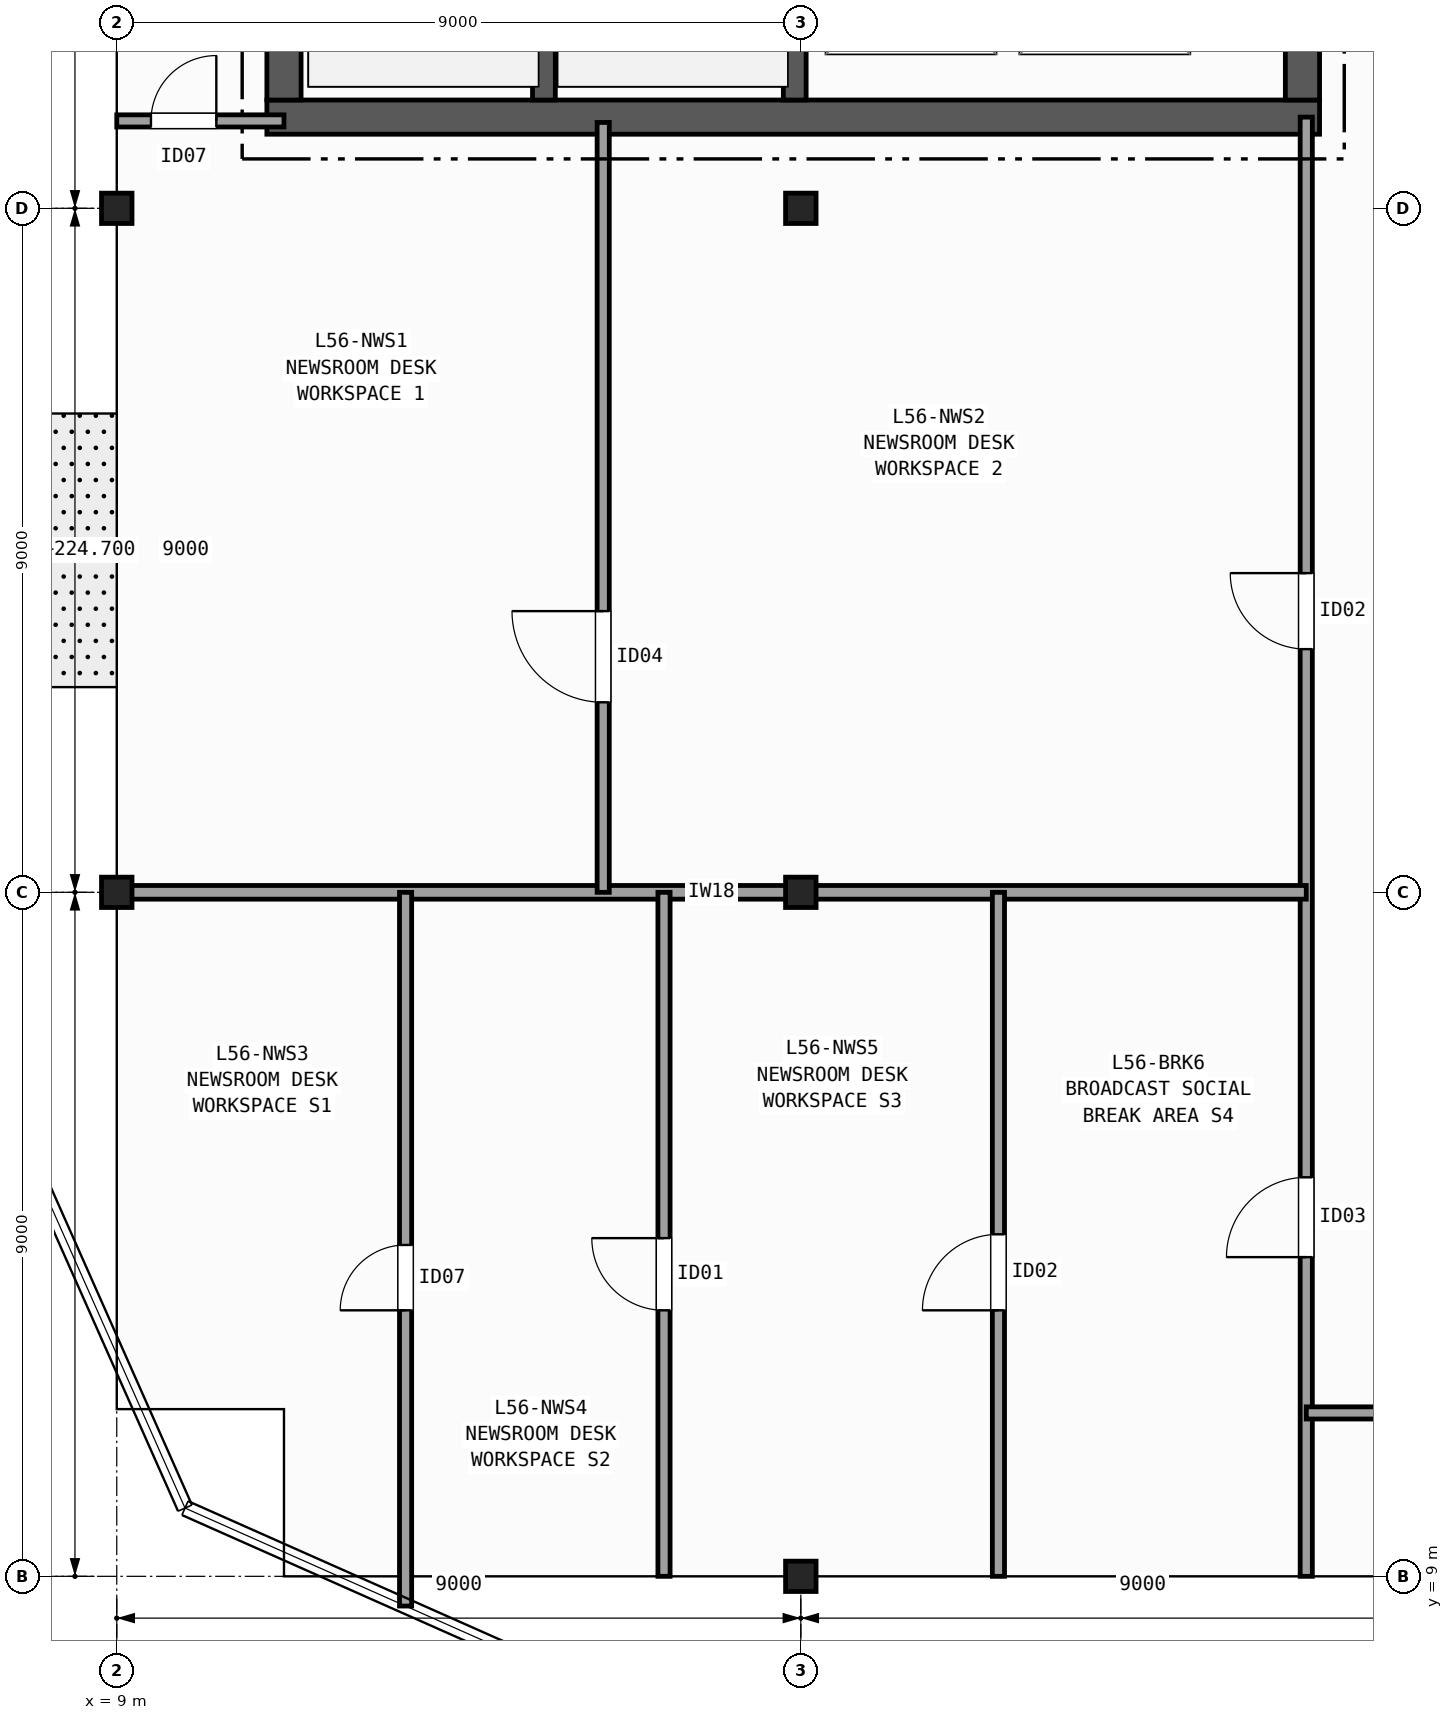
"""IFC4 building model, lengths in metres.
Left out: names, types, materials, properties, quantities, classifications, styles, units other than length and angle.
Written with IfcOpenShell. Run it as: python <this file> out.ifc"""

import sys

from ifc_helpers import new_model, si_unit, direction, frame, frame_2d, origin, origin_2d, place, context, subcontext, project, spatial, rectangle, i_section, extrude, element, fill, save


model = new_model("IFC4")
c1 = context("Model", 3, precision=1e-05, world=origin(), true_north=direction((0.0, 1.0)))
c2 = subcontext(c1, "Body", "Model", "MODEL_VIEW")
j1 = project(units=[si_unit("LENGTHUNIT", "METRE"), si_unit("PLANEANGLEUNIT", "RADIAN")], contexts=[c1])
p1 = place(None, origin())
s1 = spatial("IfcSite", under=j1, at=p1, CompositionType="ELEMENT")
p2 = place(p1, origin())
s2 = spatial("IfcBuilding", under=s1, at=p2, CompositionType="ELEMENT")
p3 = place(p2, frame((0.0, 0.0, 224.7)))
s3 = spatial("IfcBuildingStorey", under=s2, at=p3, CompositionType="ELEMENT", Elevation=224.7)
for number, where, z_axis, x_axis in (
    (1, (9.0, 18.0, 0.0), (0.0, 0.0, 1.0), (1.0, 0.0, 0.0)),
    (2, (9.0, 27.0, 0.0), (0.0, 0.0, 1.0), (1.0, 0.0, 0.0)),
    (3, (18.0, 9.0, 0.0), (0.0, 0.0, 1.0), (1.0, 0.0, 0.0)),
    (4, (18.0, 18.0, 0.0), (0.0, 0.0, 1.0), (1.0, 0.0, 0.0)),
    (5, (18.0, 27.0, 0.0), (0.0, 0.0, 1.0), (1.0, 0.0, 0.0)),
):
    element("IfcColumn", number, at=place(p3, frame(where, z_axis=z_axis, x_axis=x_axis)), inside=s3, PredefinedType="COLUMN", context=c2, shape_type="SweptSolid", body=[
        extrude(i_section(OverallWidth=0.401, OverallDepth=0.399, WebThickness=0.025, FlangeThickness=0.04, FilletRadius=0.015, at=origin_2d()), origin(), (0.0, 0.0, 1.0), 3.7),
    ])
p4 = place(p3, frame((10.975, 28.2, 0.0), z_axis=(0.0, 0.0, 1.0), x_axis=(1.0, 0.0, 0.0)))
e6 = element("IfcWall", 6, at=p4, inside=s3, PredefinedType="SHEAR", context=c2, shape_type="SweptSolid", body=[
    extrude(rectangle(XDim=13.85, YDim=0.45, at=frame_2d((6.925, 0.0))), origin(), (0.0, 0.0, 1.0), 3.42),
])
p5 = place(p3, frame((11.2, 42.175, 0.0), z_axis=(0.0, 0.0, 1.0), x_axis=(0.0, -1.0, 0.0)))
e7 = element("IfcWall", 7, at=p5, inside=s3, PredefinedType="SHEAR", context=c2, shape_type="SweptSolid", body=[
    extrude(rectangle(XDim=13.75, YDim=0.45, at=frame_2d((6.875, 0.0))), origin(), (0.0, 0.0, 1.0), 3.42),
])
p6 = place(p3, frame((24.6, 28.425, 0.0), z_axis=(0.0, 0.0, 1.0), x_axis=(0.0, 1.0, 0.0)))
e8 = element("IfcWall", 8, at=p6, inside=s3, PredefinedType="SHEAR", context=c2, shape_type="SweptSolid", body=[
    extrude(rectangle(XDim=13.75, YDim=0.45, at=frame_2d((6.875, 0.0))), origin(), (0.0, 0.0, 1.0), 3.42),
])
p7 = place(p6, frame((3.375, 0.0, 0.0)))
e9 = element("IfcOpeningElement", 9, at=p7, cuts=e8, PredefinedType="OPENING", context=c2, shape_type="SweptSolid", body=[
    extrude(rectangle(XDim=1.5, YDim=2.2, at=frame_2d((0.75, 1.1))), frame((0.0, 0.235, 0.0), z_axis=(0.0, -1.0, 0.0), x_axis=(1.0, 0.0, 0.0)), (0.0, 0.0, 1.0), 0.47),
])
p8 = place(p6, frame((9.975, 0.0, 0.0)))
e10 = element("IfcOpeningElement", 10, at=p8, cuts=e8, PredefinedType="OPENING", context=c2, shape_type="SweptSolid", body=[
    extrude(rectangle(XDim=0.9, YDim=2.1, at=frame_2d((0.45, 1.05))), frame((0.0, 0.235, 0.0), z_axis=(0.0, -1.0, 0.0), x_axis=(1.0, 0.0, 0.0)), (0.0, 0.0, 1.0), 0.47),
])
p9 = place(p3, frame((14.62, 28.425, 0.0), z_axis=(0.0, 0.0, 1.0), x_axis=(0.0, 1.0, 0.0)))
e11 = element("IfcWall", 11, at=p9, inside=s3, PredefinedType="SHEAR", context=c2, shape_type="SweptSolid", body=[
    extrude(rectangle(XDim=9.025, YDim=0.3, at=frame_2d((4.512, 0.0))), origin(), (0.0, 0.0, 1.0), 3.42),
])
p10 = place(p3, frame((17.92, 42.175, 0.0), z_axis=(0.0, 0.0, 1.0), x_axis=(0.0, -1.0, 0.0)))
e12 = element("IfcWall", 12, at=p10, inside=s3, PredefinedType="SHEAR", context=c2, shape_type="SweptSolid", body=[
    extrude(rectangle(XDim=13.75, YDim=0.3, at=frame_2d((6.875, 0.0))), origin(), (0.0, 0.0, 1.0), 3.42),
])
p11 = place(p10, frame((2.0, 0.0, 0.0)))
e13 = element("IfcOpeningElement", 13, at=p11, cuts=e12, PredefinedType="OPENING", context=c2, shape_type="SweptSolid", body=[
    extrude(rectangle(XDim=1.15, YDim=2.15, at=frame_2d((0.575, 1.075))), frame((0.0, 0.16, 0.0), z_axis=(0.0, -1.0, 0.0), x_axis=(1.0, 0.0, 0.0)), (0.0, 0.0, 1.0), 0.32),
])
p12 = place(p3, frame((9.0, 28.15, 0.0), z_axis=(0.0, 0.0, 1.0), x_axis=(1.0, 0.0, 0.0)))
e14 = element("IfcWall", 14, at=p12, inside=s3, PredefinedType="PARTITIONING", context=c2, shape_type="SweptSolid", body=[
    extrude(rectangle(XDim=2.2, YDim=0.16, at=frame_2d((1.1, 0.0))), origin(), (0.0, 0.0, 1.0), 2.707),
])
p13 = place(p12, frame((0.45, 0.0, 0.0)))
e15 = element("IfcOpeningElement", 15, at=p13, cuts=e14, PredefinedType="OPENING", context=c2, shape_type="SweptSolid", body=[
    extrude(rectangle(XDim=0.86, YDim=2.05, at=frame_2d((0.43, 1.025))), frame((0.0, 0.09, 0.0), z_axis=(0.0, -1.0, 0.0), x_axis=(1.0, 0.0, 0.0)), (0.0, 0.0, 1.0), 0.18),
])
p14 = place(p3, frame((24.65, 9.0, 0.0), z_axis=(0.0, 0.0, 1.0), x_axis=(0.0, 1.0, 0.0)))
e16 = element("IfcWall", 16, at=p14, inside=s3, PredefinedType="PARTITIONING", context=c2, shape_type="SweptSolid", body=[
    extrude(rectangle(XDim=19.2, YDim=0.16, at=frame_2d((9.6, 0.0))), origin(), (0.0, 0.0, 1.0), 2.707),
])
p15 = place(p14, frame((12.2, 0.0, 0.0)))
e17 = element("IfcOpeningElement", 17, at=p15, cuts=e16, PredefinedType="OPENING", context=c2, shape_type="SweptSolid", body=[
    extrude(rectangle(XDim=1.0, YDim=2.1, at=frame_2d((0.5, 1.05))), frame((0.0, 0.09, 0.0), z_axis=(0.0, -1.0, 0.0), x_axis=(1.0, 0.0, 0.0)), (0.0, 0.0, 1.0), 0.18),
])
p16 = place(p14, frame((4.2, 0.0, 0.0)))
e18 = element("IfcOpeningElement", 18, at=p16, cuts=e16, PredefinedType="OPENING", context=c2, shape_type="SweptSolid", body=[
    extrude(rectangle(XDim=1.05, YDim=2.15, at=frame_2d((0.525, 1.075))), frame((0.0, 0.09, 0.0), z_axis=(0.0, -1.0, 0.0), x_axis=(1.0, 0.0, 0.0)), (0.0, 0.0, 1.0), 0.18),
])
p17 = place(p3, frame((9.0, 18.0, 0.0), z_axis=(0.0, 0.0, 1.0), x_axis=(1.0, 0.0, 0.0)))
e19 = element("IfcWall", 19, at=p17, inside=s3, PredefinedType="PARTITIONING", context=c2, shape_type="SweptSolid", body=[
    extrude(rectangle(XDim=15.65, YDim=0.18, at=frame_2d((7.825, 0.0))), origin(), (0.0, 0.0, 1.0), 2.707),
])
p18 = place(p3, frame((15.4, 18.0, 0.0), z_axis=(0.0, 0.0, 1.0), x_axis=(0.0, 1.0, 0.0)))
e20 = element("IfcWall", 20, at=p18, inside=s3, PredefinedType="PARTITIONING", context=c2, shape_type="SweptSolid", body=[
    extrude(rectangle(XDim=10.13, YDim=0.16, at=frame_2d((5.065, 0.0))), origin(), (0.0, 0.0, 1.0), 2.789),
])
p19 = place(p18, frame((2.5, 0.0, 0.0)))
e21 = element("IfcOpeningElement", 21, at=p19, cuts=e20, PredefinedType="OPENING", context=c2, shape_type="SweptSolid", body=[
    extrude(rectangle(XDim=1.2, YDim=2.15, at=frame_2d((0.6, 1.075))), frame((0.0, 0.09, 0.0), z_axis=(0.0, -1.0, 0.0), x_axis=(1.0, 0.0, 0.0)), (0.0, 0.0, 1.0), 0.18),
])
p20 = place(p3, frame((12.8, 8.609, 0.0), z_axis=(0.0, 0.0, 1.0), x_axis=(0.0, 1.0, 0.0)))
e22 = element("IfcWall", 22, at=p20, inside=s3, PredefinedType="PARTITIONING", context=c2, shape_type="SweptSolid", body=[
    extrude(rectangle(XDim=9.391, YDim=0.16, at=frame_2d((4.696, 0.0))), origin(), (0.0, 0.0, 1.0), 2.789),
])
p21 = place(p20, frame((3.891, 0.0, 0.0)))
e23 = element("IfcOpeningElement", 23, at=p21, cuts=e22, PredefinedType="OPENING", context=c2, shape_type="SweptSolid", body=[
    extrude(rectangle(XDim=0.86, YDim=2.05, at=frame_2d((0.43, 1.025))), frame((0.0, 0.09, 0.0), z_axis=(0.0, -1.0, 0.0), x_axis=(1.0, 0.0, 0.0)), (0.0, 0.0, 1.0), 0.18),
])
p22 = place(p3, frame((16.2, 9.0, 0.0), z_axis=(0.0, 0.0, 1.0), x_axis=(0.0, 1.0, 0.0)))
e24 = element("IfcWall", 24, at=p22, inside=s3, PredefinedType="PARTITIONING", context=c2, shape_type="SweptSolid", body=[
    extrude(rectangle(XDim=9.0, YDim=0.16, at=frame_2d((4.5, 0.0))), origin(), (0.0, 0.0, 1.0), 2.789),
])
p23 = place(p22, frame((3.5, 0.0, 0.0)))
e25 = element("IfcOpeningElement", 25, at=p23, cuts=e24, PredefinedType="OPENING", context=c2, shape_type="SweptSolid", body=[
    extrude(rectangle(XDim=0.95, YDim=2.1, at=frame_2d((0.475, 1.05))), frame((0.0, 0.09, 0.0), z_axis=(0.0, -1.0, 0.0), x_axis=(1.0, 0.0, 0.0)), (0.0, 0.0, 1.0), 0.18),
])
p24 = place(p3, frame((20.6, 9.0, 0.0), z_axis=(0.0, 0.0, 1.0), x_axis=(0.0, 1.0, 0.0)))
e26 = element("IfcWall", 26, at=p24, inside=s3, PredefinedType="PARTITIONING", context=c2, shape_type="SweptSolid", body=[
    extrude(rectangle(XDim=9.0, YDim=0.16, at=frame_2d((4.5, 0.0))), origin(), (0.0, 0.0, 1.0), 2.707),
])
p25 = place(p24, frame((3.5, 0.0, 0.0)))
e27 = element("IfcOpeningElement", 27, at=p25, cuts=e26, PredefinedType="OPENING", context=c2, shape_type="SweptSolid", body=[
    extrude(rectangle(XDim=1.0, YDim=2.1, at=frame_2d((0.5, 1.05))), frame((0.0, 0.09, 0.0), z_axis=(0.0, -1.0, 0.0), x_axis=(1.0, 0.0, 0.0)), (0.0, 0.0, 1.0), 0.18),
])
p26 = place(p3, frame((24.65, 11.15, 0.0), z_axis=(0.0, 0.0, 1.0), x_axis=(1.0, 0.0, 0.0)))
e28 = element("IfcWall", 28, at=p26, inside=s3, PredefinedType="PARTITIONING", context=c2, shape_type="SweptSolid", body=[
    extrude(rectangle(XDim=4.75, YDim=0.16, at=frame_2d((2.375, 0.0))), origin(), (0.0, 0.0, 1.0), 2.792),
])
p27 = place(p26, frame((1.2, 0.0, 0.0)))
e29 = element("IfcOpeningElement", 29, at=p27, cuts=e28, PredefinedType="OPENING", context=c2, shape_type="SweptSolid", body=[
    extrude(rectangle(XDim=1.05, YDim=2.15, at=frame_2d((0.525, 1.075))), frame((0.0, 0.09, 0.0), z_axis=(0.0, -1.0, 0.0), x_axis=(1.0, 0.0, 0.0)), (0.0, 0.0, 1.0), 0.18),
])
p28 = place(p13, origin())
e30 = element("IfcDoor", 30, at=p28, inside=s3, OperationType="SINGLE_SWING_RIGHT", PredefinedType="DOOR", context=c2, shape_type="SweptSolid", body=[
    extrude(rectangle(XDim=0.86, YDim=2.05, at=frame_2d((0.43, 1.025))), frame((0.0, 0.025, 0.0), z_axis=(0.0, -1.0, 0.0), x_axis=(1.0, 0.0, 0.0)), (0.0, 0.0, 1.0), 0.05),
])
fill(e15, e30)
p29 = place(p15, origin())
e31 = element("IfcDoor", 31, at=p29, inside=s3, OperationType="SINGLE_SWING_RIGHT", PredefinedType="DOOR", context=c2, shape_type="SweptSolid", body=[
    extrude(rectangle(XDim=1.0, YDim=2.1, at=frame_2d((0.5, 1.05))), frame((0.0, 0.025, 0.0), z_axis=(0.0, -1.0, 0.0), x_axis=(1.0, 0.0, 0.0)), (0.0, 0.0, 1.0), 0.05),
])
fill(e17, e31)
p30 = place(p16, origin())
e32 = element("IfcDoor", 32, at=p30, inside=s3, OperationType="SINGLE_SWING_LEFT", PredefinedType="DOOR", context=c2, shape_type="SweptSolid", body=[
    extrude(rectangle(XDim=1.05, YDim=2.15, at=frame_2d((0.525, 1.075))), frame((0.0, 0.025, 0.0), z_axis=(0.0, -1.0, 0.0), x_axis=(1.0, 0.0, 0.0)), (0.0, 0.0, 1.0), 0.05),
])
fill(e18, e32)
p31 = place(p19, origin())
e33 = element("IfcDoor", 33, at=p31, inside=s3, OperationType="SINGLE_SWING_RIGHT", PredefinedType="DOOR", context=c2, shape_type="SweptSolid", body=[
    extrude(rectangle(XDim=1.2, YDim=2.15, at=frame_2d((0.6, 1.075))), frame((0.0, 0.025, 0.0), z_axis=(0.0, -1.0, 0.0), x_axis=(1.0, 0.0, 0.0)), (0.0, 0.0, 1.0), 0.05),
])
fill(e21, e33)
p32 = place(p21, origin())
e34 = element("IfcDoor", 34, at=p32, inside=s3, OperationType="SINGLE_SWING_LEFT", PredefinedType="DOOR", context=c2, shape_type="SweptSolid", body=[
    extrude(rectangle(XDim=0.86, YDim=2.05, at=frame_2d((0.43, 1.025))), frame((0.0, 0.025, 0.0), z_axis=(0.0, -1.0, 0.0), x_axis=(1.0, 0.0, 0.0)), (0.0, 0.0, 1.0), 0.05),
])
fill(e23, e34)
p33 = place(p23, origin())
e35 = element("IfcDoor", 35, at=p33, inside=s3, OperationType="SINGLE_SWING_RIGHT", PredefinedType="DOOR", context=c2, shape_type="SweptSolid", body=[
    extrude(rectangle(XDim=0.95, YDim=2.1, at=frame_2d((0.475, 1.05))), frame((0.0, 0.025, 0.0), z_axis=(0.0, -1.0, 0.0), x_axis=(1.0, 0.0, 0.0)), (0.0, 0.0, 1.0), 0.05),
])
fill(e25, e35)
p34 = place(p25, origin())
e36 = element("IfcDoor", 36, at=p34, inside=s3, OperationType="SINGLE_SWING_LEFT", PredefinedType="DOOR", context=c2, shape_type="SweptSolid", body=[
    extrude(rectangle(XDim=1.0, YDim=2.1, at=frame_2d((0.5, 1.05))), frame((0.0, 0.025, 0.0), z_axis=(0.0, -1.0, 0.0), x_axis=(1.0, 0.0, 0.0)), (0.0, 0.0, 1.0), 0.05),
])
fill(e27, e36)
save(model, sys.argv[1])
